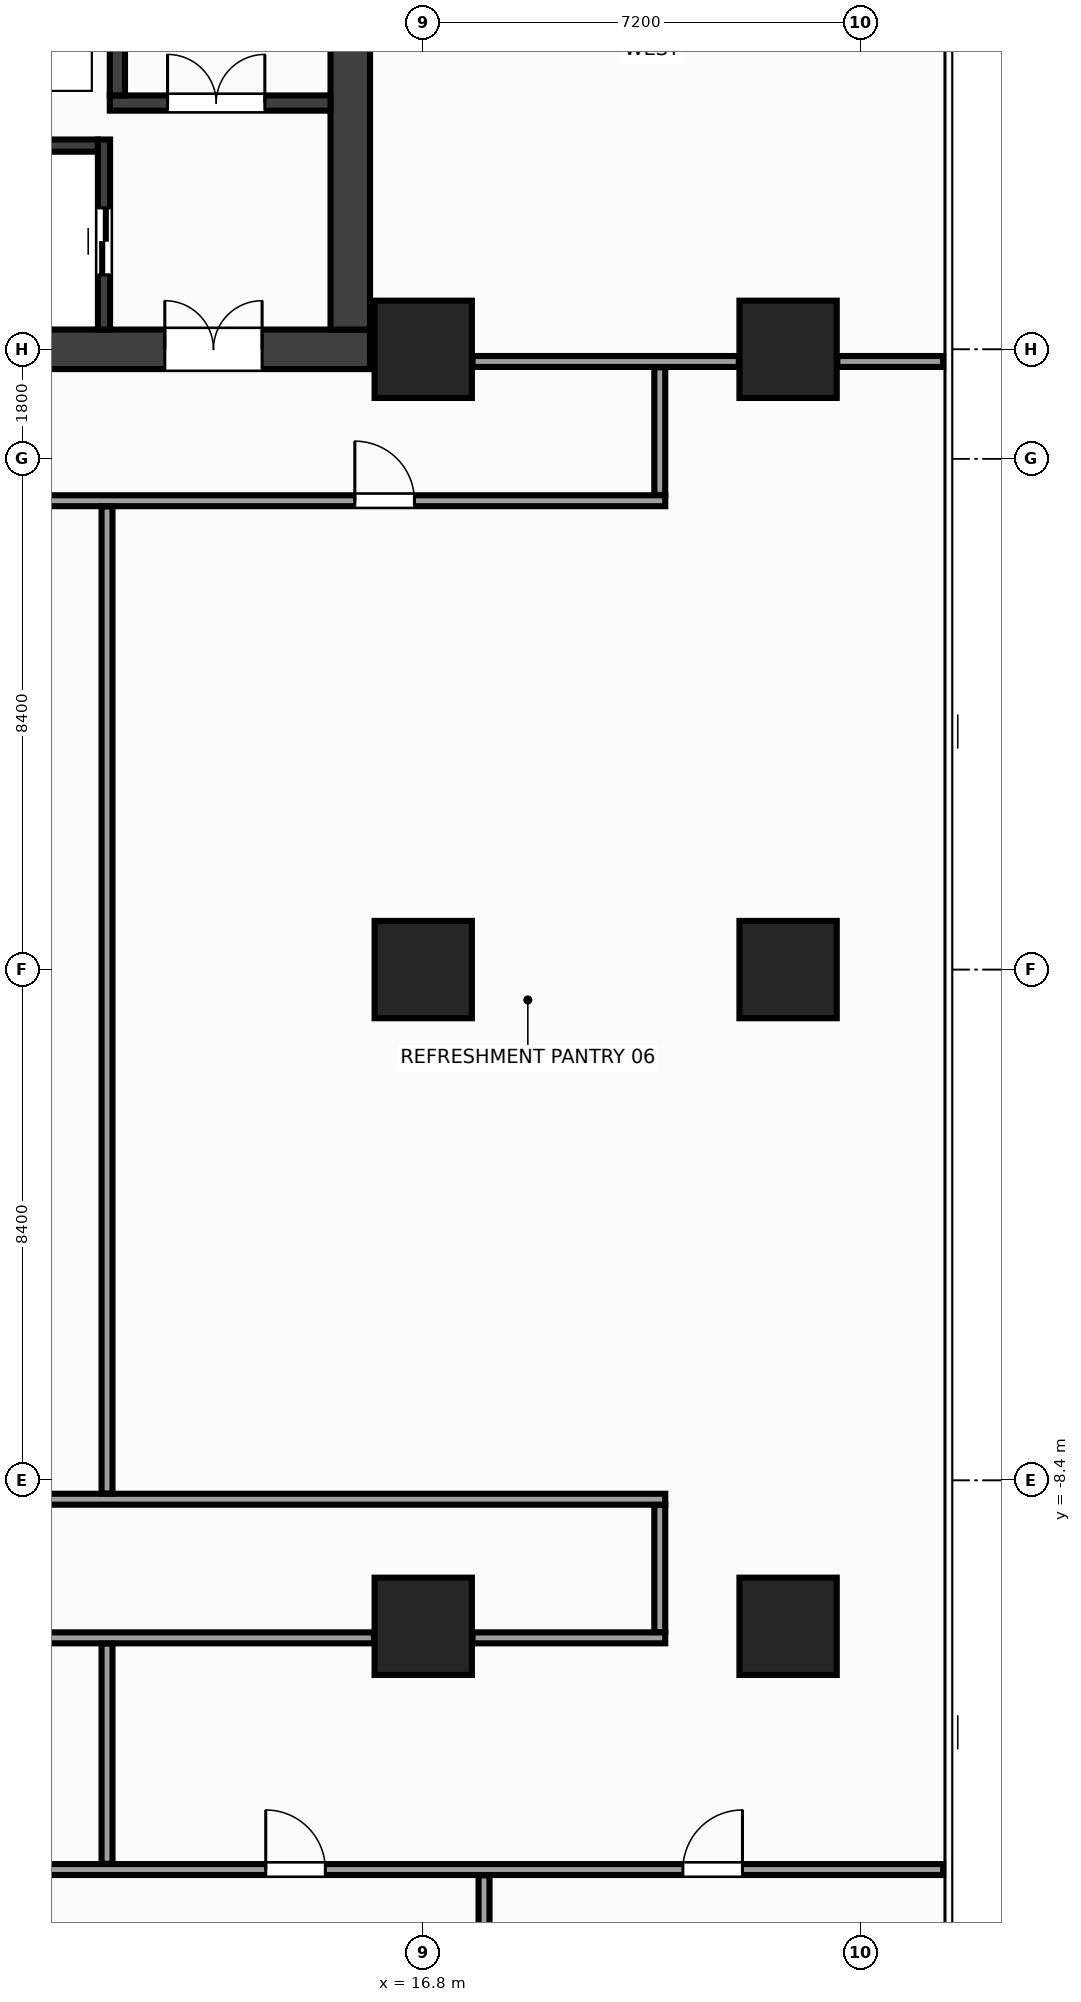
"""IFC4 building model, lengths in metres.
Left out: names, types, materials, properties, quantities, classifications, styles, units other than length and angle.
Written with IfcOpenShell. Run it as: python <this file> out.ifc"""

import sys

from ifc_helpers import new_model, si_unit, direction, frame, frame_2d, origin, origin_2d, place, context, subcontext, project, spatial, rectangle, extrude, source, transform, mapped, element, fill, save


model = new_model("IFC4")
c1 = context("Model", 3, precision=1e-05, world=origin(), true_north=direction((0.0, 1.0)))
c2 = subcontext(c1, "Body", "Model", "MODEL_VIEW")
j1 = project(units=[si_unit("LENGTHUNIT", "METRE"), si_unit("PLANEANGLEUNIT", "RADIAN")], contexts=[c1])
p1 = place(None, origin())
s1 = spatial("IfcSite", under=j1, at=p1, CompositionType="ELEMENT")
p2 = place(p1, origin())
s2 = spatial("IfcBuilding", under=s1, at=p2, CompositionType="ELEMENT")
p3 = place(p2, frame((0.0, 0.0, 113.6)))
s3 = spatial("IfcBuildingStorey", under=s2, at=p3, CompositionType="ELEMENT", Elevation=113.6)
m1 = source(origin(), c2, "Body", "SweptSolid", [
    extrude(rectangle(XDim=31.85, YDim=0.65, at=frame_2d((15.925, 0.0))), origin(), (0.0, 0.0, 1.0), 3.6),
])
p4 = place(p3, frame((-15.925, 10.2, 0.0), z_axis=(0.0, 0.0, 1.0), x_axis=(1.0, 0.0, 0.0)))
e1 = element("IfcWall", 1, at=p4, inside=s3, PredefinedType="SHEAR", context=c2, shape_type="MappedRepresentation", body=[
    mapped(m1, transform((0.0, 0.0, 0.0), x_axis=(1.0, 0.0, 0.0), y_axis=(0.0, 1.0, 0.0), z_axis=(0.0, 0.0, 1.0), scale=1.0)),
])
p5 = place(p4, frame((1.775, 0.0, 0.0)))
e2 = element("IfcOpeningElement", 2, at=p5, cuts=e1, PredefinedType="OPENING", context=c2, shape_type="SweptSolid", body=[
    extrude(rectangle(XDim=1.6, YDim=2.15, at=frame_2d((0.8, 1.075))), frame((0.0, 0.337, 0.0), z_axis=(0.0, -1.0, 0.0), x_axis=(1.0, 0.0, 0.0)), (0.0, 0.0, 1.0), 0.674),
])
p6 = place(p4, frame((28.475, 0.0, 0.0)))
e3 = element("IfcOpeningElement", 3, at=p6, cuts=e1, PredefinedType="OPENING", context=c2, shape_type="SweptSolid", body=[
    extrude(rectangle(XDim=1.6, YDim=2.15, at=frame_2d((0.8, 1.075))), frame((0.0, 0.337, 0.0), z_axis=(0.0, -1.0, 0.0), x_axis=(1.0, 0.0, 0.0)), (0.0, 0.0, 1.0), 0.674),
])
p7 = place(p4, frame((15.175, 0.0, 0.0)))
e4 = element("IfcOpeningElement", 4, at=p7, cuts=e1, PredefinedType="OPENING", context=c2, shape_type="SweptSolid", body=[
    extrude(rectangle(XDim=1.5, YDim=2.2, at=frame_2d((0.75, 1.1))), frame((0.0, 0.337, 0.0), z_axis=(0.0, -1.0, 0.0), x_axis=(1.0, 0.0, 0.0)), (0.0, 0.0, 1.0), 0.674),
])
m2 = source(origin(), c2, "Body", "SweptSolid", [
    extrude(rectangle(XDim=12.95, YDim=0.65, at=frame_2d((6.475, 0.0))), origin(), (0.0, 0.0, 1.0), 3.6),
])
p8 = place(p3, frame((15.6, 10.525, 0.0), z_axis=(0.0, 0.0, 1.0), x_axis=(0.0, 1.0, 0.0)))
e5 = element("IfcWall", 5, at=p8, inside=s3, PredefinedType="SHEAR", context=c2, shape_type="MappedRepresentation", body=[
    mapped(m2, transform((0.0, 0.0, 0.0), x_axis=(1.0, 0.0, 0.0), y_axis=(0.0, 1.0, 0.0), z_axis=(0.0, 0.0, 1.0), scale=1.0)),
])
m3 = source(origin(), c2, "Body", "SweptSolid", [
    extrude(rectangle(XDim=3.63, YDim=0.25, at=frame_2d((1.815, 0.0))), origin(), (0.0, 0.0, 1.0), 3.6),
])
p9 = place(p3, frame((11.645, 14.25, 0.0), z_axis=(0.0, 0.0, 1.0), x_axis=(1.0, 0.0, 0.0)))
e6 = element("IfcWall", 6, at=p9, inside=s3, PredefinedType="SHEAR", context=c2, shape_type="MappedRepresentation", body=[
    mapped(m3, transform((0.0, 0.0, 0.0), x_axis=(1.0, 0.0, 0.0), y_axis=(0.0, 1.0, 0.0), z_axis=(0.0, 0.0, 1.0), scale=1.0)),
])
p10 = place(p9, frame((0.95, 0.0, 0.0)))
e7 = element("IfcOpeningElement", 7, at=p10, cuts=e6, PredefinedType="OPENING", context=c2, shape_type="SweptSolid", body=[
    extrude(rectangle(XDim=1.6, YDim=2.15, at=frame_2d((0.8, 1.075))), frame((0.0, 0.137, 0.0), z_axis=(0.0, -1.0, 0.0), x_axis=(1.0, 0.0, 0.0)), (0.0, 0.0, 1.0), 0.274),
])
m4 = source(origin(), c2, "Body", "SweptSolid", [
    extrude(rectangle(XDim=9.1, YDim=0.25, at=frame_2d((4.55, 0.0))), origin(), (0.0, 0.0, 1.0), 3.6),
])
p11 = place(p3, frame((11.77, 14.375, 0.0), z_axis=(0.0, 0.0, 1.0), x_axis=(0.0, 1.0, 0.0)))
e8 = element("IfcWall", 8, at=p11, inside=s3, PredefinedType="SHEAR", context=c2, shape_type="MappedRepresentation", body=[
    mapped(m4, transform((0.0, 0.0, 0.0), x_axis=(1.0, 0.0, 0.0), y_axis=(0.0, 1.0, 0.0), z_axis=(0.0, 0.0, 1.0), scale=1.0)),
])
m5 = source(origin(), c2, "Body", "SweptSolid", [
    extrude(rectangle(XDim=3.125, YDim=0.2, at=frame_2d((1.562, 0.0))), origin(), (0.0, 0.0, 1.0), 3.6),
])
p12 = place(p3, frame((11.55, 10.525, 0.0), z_axis=(0.0, 0.0, 1.0), x_axis=(0.0, 1.0, 0.0)))
e9 = element("IfcWall", 9, at=p12, inside=s3, PredefinedType="SHEAR", context=c2, shape_type="MappedRepresentation", body=[
    mapped(m5, transform((0.0, 0.0, 0.0), x_axis=(1.0, 0.0, 0.0), y_axis=(0.0, 1.0, 0.0), z_axis=(0.0, 0.0, 1.0), scale=1.0)),
])
p13 = place(p12, frame((0.9, 0.0, 0.0)))
e10 = element("IfcOpeningElement", 10, at=p13, cuts=e9, PredefinedType="OPENING", context=c2, shape_type="SweptSolid", body=[
    extrude(rectangle(XDim=1.1, YDim=2.15, at=frame_2d((0.55, 1.075))), frame((0.0, 0.112, 0.0), z_axis=(0.0, -1.0, 0.0), x_axis=(1.0, 0.0, 0.0)), (0.0, 0.0, 1.0), 0.224),
])
m6 = source(origin(), c2, "Body", "SweptSolid", [
    extrude(rectangle(XDim=2.825, YDim=0.2, at=frame_2d((1.413, 0.0))), origin(), (0.0, 0.0, 1.0), 3.6),
])
p14 = place(p3, frame((8.625, 13.55, 0.0), z_axis=(0.0, 0.0, 1.0), x_axis=(1.0, 0.0, 0.0)))
e11 = element("IfcWall", 11, at=p14, inside=s3, PredefinedType="SHEAR", context=c2, shape_type="MappedRepresentation", body=[
    mapped(m6, transform((0.0, 0.0, 0.0), x_axis=(1.0, 0.0, 0.0), y_axis=(0.0, 1.0, 0.0), z_axis=(0.0, 0.0, 1.0), scale=1.0)),
])
m7 = source(origin(), c2, "Body", "SweptSolid", [
    extrude(rectangle(XDim=1.6, YDim=1.6, at=origin_2d()), origin(), (0.0, 0.0, 1.0), 3.6),
])
for number, where, z_axis, x_axis in (
    (12, (16.8, -10.8, 0.0), (0.0, 0.0, 1.0), (1.0, 0.0, 0.0)),
    (13, (16.8, 0.0, 0.0), (0.0, 0.0, 1.0), (1.0, 0.0, 0.0)),
    (14, (16.8, 10.2, 0.0), (0.0, 0.0, 1.0), (1.0, 0.0, 0.0)),
    (15, (22.8, -10.8, 0.0), (0.0, 0.0, 1.0), (1.0, 0.0, 0.0)),
    (16, (22.8, 0.0, 0.0), (0.0, 0.0, 1.0), (1.0, 0.0, 0.0)),
    (17, (22.8, 10.2, 0.0), (0.0, 0.0, 1.0), (1.0, 0.0, 0.0)),
):
    element("IfcColumn", number, at=place(p3, frame(where, z_axis=z_axis, x_axis=x_axis)), inside=s3, PredefinedType="COLUMN", context=c2, shape_type="MappedRepresentation", body=[
        mapped(m7, transform((0.0, 0.0, 0.0), x_axis=(1.0, 0.0, 0.0), y_axis=(0.0, 1.0, 0.0), z_axis=(0.0, 0.0, 1.0), scale=1.0)),
    ])
m8 = source(origin(), c2, "Body", "SweptSolid", [
    extrude(rectangle(XDim=4.38, YDim=0.18, at=frame_2d((2.19, 0.0))), origin(), (0.0, 0.0, 1.0), 2.745),
])
p15 = place(p3, frame((17.61, 10.0, 0.0), z_axis=(0.0, 0.0, 1.0), x_axis=(1.0, 0.0, 0.0)))
e18 = element("IfcWall", 18, at=p15, inside=s3, PredefinedType="PARTITIONING", context=c2, shape_type="MappedRepresentation", body=[
    mapped(m8, transform((0.0, 0.0, 0.0), x_axis=(1.0, 0.0, 0.0), y_axis=(0.0, 1.0, 0.0), z_axis=(0.0, 0.0, 1.0), scale=1.0)),
])
m9 = source(origin(), c2, "Body", "SweptSolid", [
    extrude(rectangle(XDim=1.74, YDim=0.18, at=frame_2d((0.87, 0.0))), origin(), (0.0, 0.0, 1.0), 3.36),
])
p16 = place(p3, frame((23.61, 10.0, 0.0), z_axis=(0.0, 0.0, 1.0), x_axis=(1.0, 0.0, 0.0)))
e19 = element("IfcWall", 19, at=p16, inside=s3, PredefinedType="PARTITIONING", context=c2, shape_type="MappedRepresentation", body=[
    mapped(m9, transform((0.0, 0.0, 0.0), x_axis=(1.0, 0.0, 0.0), y_axis=(0.0, 1.0, 0.0), z_axis=(0.0, 0.0, 1.0), scale=1.0)),
])
m10 = source(origin(), c2, "Body", "SweptSolid", [
    extrude(rectangle(XDim=22.3, YDim=0.18, at=frame_2d((11.15, 0.0))), origin(), (0.0, 0.0, 1.0), 2.745),
])
p17 = place(p3, frame((-1.52, 7.71, 0.0), z_axis=(0.0, 0.0, 1.0), x_axis=(1.0, 0.0, 0.0)))
e20 = element("IfcWall", 20, at=p17, inside=s3, PredefinedType="PARTITIONING", context=c2, shape_type="MappedRepresentation", body=[
    mapped(m10, transform((0.0, 0.0, 0.0), x_axis=(1.0, 0.0, 0.0), y_axis=(0.0, 1.0, 0.0), z_axis=(0.0, 0.0, 1.0), scale=1.0)),
])
p18 = place(p17, frame((0.685, 0.0, 0.0)))
e21 = element("IfcOpeningElement", 21, at=p18, cuts=e20, PredefinedType="OPENING", context=c2, shape_type="SweptSolid", body=[
    extrude(rectangle(XDim=0.98, YDim=2.15, at=frame_2d((0.49, 1.075))), frame((0.0, 0.102, 0.0), z_axis=(0.0, -1.0, 0.0), x_axis=(1.0, 0.0, 0.0)), (0.0, 0.0, 1.0), 0.204),
])
p19 = place(p17, frame((7.23, 0.0, 0.0)))
e22 = element("IfcOpeningElement", 22, at=p19, cuts=e20, PredefinedType="OPENING", context=c2, shape_type="SweptSolid", body=[
    extrude(rectangle(XDim=0.98, YDim=2.15, at=frame_2d((0.49, 1.075))), frame((0.0, 0.102, 0.0), z_axis=(0.0, -1.0, 0.0), x_axis=(1.0, 0.0, 0.0)), (0.0, 0.0, 1.0), 0.204),
])
p20 = place(p17, frame((17.195, 0.0, 0.0)))
e23 = element("IfcOpeningElement", 23, at=p20, cuts=e20, PredefinedType="OPENING", context=c2, shape_type="SweptSolid", body=[
    extrude(rectangle(XDim=0.98, YDim=2.15, at=frame_2d((0.49, 1.075))), frame((0.0, 0.102, 0.0), z_axis=(0.0, -1.0, 0.0), x_axis=(1.0, 0.0, 0.0)), (0.0, 0.0, 1.0), 0.204),
])
p21 = place(p3, frame((-1.52, -8.71, 0.0), z_axis=(0.0, 0.0, 1.0), x_axis=(1.0, 0.0, 0.0)))
e24 = element("IfcWall", 24, at=p21, inside=s3, PredefinedType="PARTITIONING", context=c2, shape_type="MappedRepresentation", body=[
    mapped(m10, transform((0.0, 0.0, 0.0), x_axis=(1.0, 0.0, 0.0), y_axis=(0.0, 1.0, 0.0), z_axis=(0.0, 0.0, 1.0), scale=1.0)),
])
m11 = source(origin(), c2, "Body", "SweptSolid", [
    extrude(rectangle(XDim=7.08, YDim=0.18, at=frame_2d((3.54, 0.0))), origin(), (0.0, 0.0, 1.0), 2.745),
])
p22 = place(p3, frame((8.91, -10.99, 0.0), z_axis=(0.0, 0.0, 1.0), x_axis=(1.0, 0.0, 0.0)))
e25 = element("IfcWall", 25, at=p22, inside=s3, PredefinedType="PARTITIONING", context=c2, shape_type="MappedRepresentation", body=[
    mapped(m11, transform((0.0, 0.0, 0.0), x_axis=(1.0, 0.0, 0.0), y_axis=(0.0, 1.0, 0.0), z_axis=(0.0, 0.0, 1.0), scale=1.0)),
])
m12 = source(origin(), c2, "Body", "SweptSolid", [
    extrude(rectangle(XDim=3.17, YDim=0.18, at=frame_2d((1.585, 0.0))), origin(), (0.0, 0.0, 1.0), 2.745),
])
p23 = place(p3, frame((17.61, -10.99, 0.0), z_axis=(0.0, 0.0, 1.0), x_axis=(1.0, 0.0, 0.0)))
e26 = element("IfcWall", 26, at=p23, inside=s3, PredefinedType="PARTITIONING", context=c2, shape_type="MappedRepresentation", body=[
    mapped(m12, transform((0.0, 0.0, 0.0), x_axis=(1.0, 0.0, 0.0), y_axis=(0.0, 1.0, 0.0), z_axis=(0.0, 0.0, 1.0), scale=1.0)),
])
m13 = source(origin(), c2, "Body", "SweptSolid", [
    extrude(rectangle(XDim=2.1, YDim=0.18, at=frame_2d((1.05, 0.0))), origin(), (0.0, 0.0, 1.0), 3.36),
])
p24 = place(p3, frame((20.69, 7.805, 0.0), z_axis=(0.0, 0.0, 1.0), x_axis=(0.0, 1.0, 0.0)))
e27 = element("IfcWall", 27, at=p24, inside=s3, PredefinedType="PARTITIONING", context=c2, shape_type="MappedRepresentation", body=[
    mapped(m13, transform((0.0, 0.0, 0.0), x_axis=(1.0, 0.0, 0.0), y_axis=(0.0, 1.0, 0.0), z_axis=(0.0, 0.0, 1.0), scale=1.0)),
])
m14 = source(origin(), c2, "Body", "SweptSolid", [
    extrude(rectangle(XDim=2.09, YDim=0.18, at=frame_2d((1.045, 0.0))), origin(), (0.0, 0.0, 1.0), 3.36),
])
p25 = place(p3, frame((20.69, -10.895, 0.0), z_axis=(0.0, 0.0, 1.0), x_axis=(0.0, 1.0, 0.0)))
e28 = element("IfcWall", 28, at=p25, inside=s3, PredefinedType="PARTITIONING", context=c2, shape_type="MappedRepresentation", body=[
    mapped(m14, transform((0.0, 0.0, 0.0), x_axis=(1.0, 0.0, 0.0), y_axis=(0.0, 1.0, 0.0), z_axis=(0.0, 0.0, 1.0), scale=1.0)),
])
m15 = source(origin(), c2, "Body", "SweptSolid", [
    extrude(rectangle(XDim=50.7, YDim=0.18, at=frame_2d((25.35, 0.0))), origin(), (0.0, 0.0, 1.0), 2.945),
])
p26 = place(p3, frame((-25.35, -14.8, 0.0), z_axis=(0.0, 0.0, 1.0), x_axis=(1.0, 0.0, 0.0)))
e29 = element("IfcWall", 29, at=p26, inside=s3, PredefinedType="PARTITIONING", context=c2, shape_type="MappedRepresentation", body=[
    mapped(m15, transform((0.0, 0.0, 0.0), x_axis=(1.0, 0.0, 0.0), y_axis=(0.0, 1.0, 0.0), z_axis=(0.0, 0.0, 1.0), scale=1.0)),
])
p27 = place(p26, frame((2.7, 0.0, 0.0)))
e30 = element("IfcOpeningElement", 30, at=p27, cuts=e29, PredefinedType="OPENING", context=c2, shape_type="SweptSolid", body=[
    extrude(rectangle(XDim=0.98, YDim=2.15, at=frame_2d((0.49, 1.075))), frame((0.0, 0.102, 0.0), z_axis=(0.0, -1.0, 0.0), x_axis=(1.0, 0.0, 0.0)), (0.0, 0.0, 1.0), 0.204),
])
p28 = place(p26, frame((46.42, 0.0, 0.0)))
e31 = element("IfcOpeningElement", 31, at=p28, cuts=e29, PredefinedType="OPENING", context=c2, shape_type="SweptSolid", body=[
    extrude(rectangle(XDim=0.98, YDim=2.15, at=frame_2d((0.49, 1.075))), frame((0.0, 0.102, 0.0), z_axis=(0.0, -1.0, 0.0), x_axis=(1.0, 0.0, 0.0)), (0.0, 0.0, 1.0), 0.204),
])
p29 = place(p26, frame((13.16, 0.0, 0.0)))
e32 = element("IfcOpeningElement", 32, at=p29, cuts=e29, PredefinedType="OPENING", context=c2, shape_type="SweptSolid", body=[
    extrude(rectangle(XDim=0.98, YDim=2.15, at=frame_2d((0.49, 1.075))), frame((0.0, 0.102, 0.0), z_axis=(0.0, -1.0, 0.0), x_axis=(1.0, 0.0, 0.0)), (0.0, 0.0, 1.0), 0.204),
])
p30 = place(p26, frame((22.16, 0.0, 0.0)))
e33 = element("IfcOpeningElement", 33, at=p30, cuts=e29, PredefinedType="OPENING", context=c2, shape_type="SweptSolid", body=[
    extrude(rectangle(XDim=0.98, YDim=2.15, at=frame_2d((0.49, 1.075))), frame((0.0, 0.102, 0.0), z_axis=(0.0, -1.0, 0.0), x_axis=(1.0, 0.0, 0.0)), (0.0, 0.0, 1.0), 0.204),
])
p31 = place(p26, frame((30.66, 0.0, 0.0)))
e34 = element("IfcOpeningElement", 34, at=p31, cuts=e29, PredefinedType="OPENING", context=c2, shape_type="SweptSolid", body=[
    extrude(rectangle(XDim=0.98, YDim=2.15, at=frame_2d((0.49, 1.075))), frame((0.0, 0.102, 0.0), z_axis=(0.0, -1.0, 0.0), x_axis=(1.0, 0.0, 0.0)), (0.0, 0.0, 1.0), 0.204),
])
p32 = place(p26, frame((8.96, 0.0, 0.0)))
e35 = element("IfcOpeningElement", 35, at=p32, cuts=e29, PredefinedType="OPENING", context=c2, shape_type="SweptSolid", body=[
    extrude(rectangle(XDim=0.98, YDim=2.15, at=frame_2d((0.49, 1.075))), frame((0.0, 0.102, 0.0), z_axis=(0.0, -1.0, 0.0), x_axis=(1.0, 0.0, 0.0)), (0.0, 0.0, 1.0), 0.204),
])
p33 = place(p26, frame((39.56, 0.0, 0.0)))
e36 = element("IfcOpeningElement", 36, at=p33, cuts=e29, PredefinedType="OPENING", context=c2, shape_type="SweptSolid", body=[
    extrude(rectangle(XDim=0.98, YDim=2.15, at=frame_2d((0.49, 1.075))), frame((0.0, 0.102, 0.0), z_axis=(0.0, -1.0, 0.0), x_axis=(1.0, 0.0, 0.0)), (0.0, 0.0, 1.0), 0.204),
])
m16 = source(origin(), c2, "Body", "SweptSolid", [
    extrude(rectangle(XDim=3.62, YDim=0.18, at=frame_2d((1.81, 0.0))), origin(), (0.0, 0.0, 1.0), 3.36),
])
p34 = place(p3, frame((11.6, -14.705, 0.0), z_axis=(0.0, 0.0, 1.0), x_axis=(0.0, 1.0, 0.0)))
e37 = element("IfcWall", 37, at=p34, inside=s3, PredefinedType="PARTITIONING", context=c2, shape_type="MappedRepresentation", body=[
    mapped(m16, transform((0.0, 0.0, 0.0), x_axis=(1.0, 0.0, 0.0), y_axis=(0.0, 1.0, 0.0), z_axis=(0.0, 0.0, 1.0), scale=1.0)),
])
m17 = source(origin(), c2, "Body", "SweptSolid", [
    extrude(rectangle(XDim=16.23, YDim=0.18, at=frame_2d((8.115, 0.0))), origin(), (0.0, 0.0, 1.0), 2.645),
])
p35 = place(p3, frame((11.6, -8.615, 0.0), z_axis=(0.0, 0.0, 1.0), x_axis=(0.0, 1.0, 0.0)))
e38 = element("IfcWall", 38, at=p35, inside=s3, PredefinedType="PARTITIONING", context=c2, shape_type="MappedRepresentation", body=[
    mapped(m17, transform((0.0, 0.0, 0.0), x_axis=(1.0, 0.0, 0.0), y_axis=(0.0, 1.0, 0.0), z_axis=(0.0, 0.0, 1.0), scale=1.0)),
])
m18 = source(origin(), c2, "Body", "SweptSolid", [
    extrude(rectangle(XDim=10.755, YDim=0.18, at=frame_2d((5.377, 0.0))), origin(), (0.0, 0.0, 1.0), 2.745),
])
p36 = place(p3, frame((17.8, -25.65, 0.0), z_axis=(0.0, 0.0, 1.0), x_axis=(0.0, 1.0, 0.0)))
e39 = element("IfcWall", 39, at=p36, inside=s3, PredefinedType="PARTITIONING", context=c2, shape_type="MappedRepresentation", body=[
    mapped(m18, transform((0.0, 0.0, 0.0), x_axis=(1.0, 0.0, 0.0), y_axis=(0.0, 1.0, 0.0), z_axis=(0.0, 0.0, 1.0), scale=1.0)),
])
m19 = source(origin(), c2, "Body", "SweptSolid", [
    extrude(rectangle(XDim=1.6, YDim=2.15, at=frame_2d((0.8, 1.075))), frame((0.0, 0.025, 0.0), z_axis=(0.0, -1.0, 0.0), x_axis=(1.0, 0.0, 0.0)), (0.0, 0.0, 1.0), 0.05),
])
p37 = place(p10, origin())
e40 = element("IfcDoor", 40, at=p37, inside=s3, OperationType="DOUBLE_DOOR_SINGLE_SWING", PredefinedType="DOOR", context=c2, shape_type="MappedRepresentation", body=[
    mapped(m19, transform((0.0, 0.0, 0.0), x_axis=(1.0, 0.0, 0.0), y_axis=(0.0, 1.0, 0.0), z_axis=(0.0, 0.0, 1.0), scale=1.0)),
])
fill(e7, e40)
p38 = place(p6, origin())
e41 = element("IfcDoor", 41, at=p38, inside=s3, OperationType="DOUBLE_DOOR_SINGLE_SWING", PredefinedType="DOOR", context=c2, shape_type="MappedRepresentation", body=[
    mapped(m19, transform((0.0, 0.0, 0.0), x_axis=(1.0, 0.0, 0.0), y_axis=(0.0, 1.0, 0.0), z_axis=(0.0, 0.0, 1.0), scale=1.0)),
])
fill(e3, e41)
m20 = source(origin(), c2, "Body", "SweptSolid", [
    extrude(rectangle(XDim=1.1, YDim=2.15, at=frame_2d((0.55, 1.075))), frame((0.0, 0.025, 0.0), z_axis=(0.0, -1.0, 0.0), x_axis=(1.0, 0.0, 0.0)), (0.0, 0.0, 1.0), 0.05),
])
p39 = place(p13, origin())
e42 = element("IfcDoor", 42, at=p39, inside=s3, OperationType="DOUBLE_DOOR_SLIDING", PredefinedType="DOOR", context=c2, shape_type="MappedRepresentation", body=[
    mapped(m20, transform((0.0, 0.0, 0.0), x_axis=(1.0, 0.0, 0.0), y_axis=(0.0, 1.0, 0.0), z_axis=(0.0, 0.0, 1.0), scale=1.0)),
])
fill(e10, e42)
m21 = source(origin(), c2, "Body", "SweptSolid", [
    extrude(rectangle(XDim=0.98, YDim=2.15, at=frame_2d((0.49, 1.075))), frame((0.0, 0.025, 0.0), z_axis=(0.0, -1.0, 0.0), x_axis=(1.0, 0.0, 0.0)), (0.0, 0.0, 1.0), 0.05),
])
p40 = place(p20, origin())
e43 = element("IfcDoor", 43, at=p40, inside=s3, OperationType="SINGLE_SWING_LEFT", PredefinedType="DOOR", context=c2, shape_type="MappedRepresentation", body=[
    mapped(m21, transform((0.0, 0.0, 0.0), x_axis=(1.0, 0.0, 0.0), y_axis=(0.0, 1.0, 0.0), z_axis=(0.0, 0.0, 1.0), scale=1.0)),
])
fill(e23, e43)
p41 = place(p28, origin())
e44 = element("IfcDoor", 44, at=p41, inside=s3, OperationType="SINGLE_SWING_RIGHT", PredefinedType="DOOR", context=c2, shape_type="MappedRepresentation", body=[
    mapped(m21, transform((0.0, 0.0, 0.0), x_axis=(1.0, 0.0, 0.0), y_axis=(0.0, 1.0, 0.0), z_axis=(0.0, 0.0, 1.0), scale=1.0)),
])
fill(e31, e44)
p42 = place(p33, origin())
e45 = element("IfcDoor", 45, at=p42, inside=s3, OperationType="SINGLE_SWING_LEFT", PredefinedType="DOOR", context=c2, shape_type="MappedRepresentation", body=[
    mapped(m21, transform((0.0, 0.0, 0.0), x_axis=(1.0, 0.0, 0.0), y_axis=(0.0, 1.0, 0.0), z_axis=(0.0, 0.0, 1.0), scale=1.0)),
])
fill(e36, e45)
save(model, sys.argv[1])
